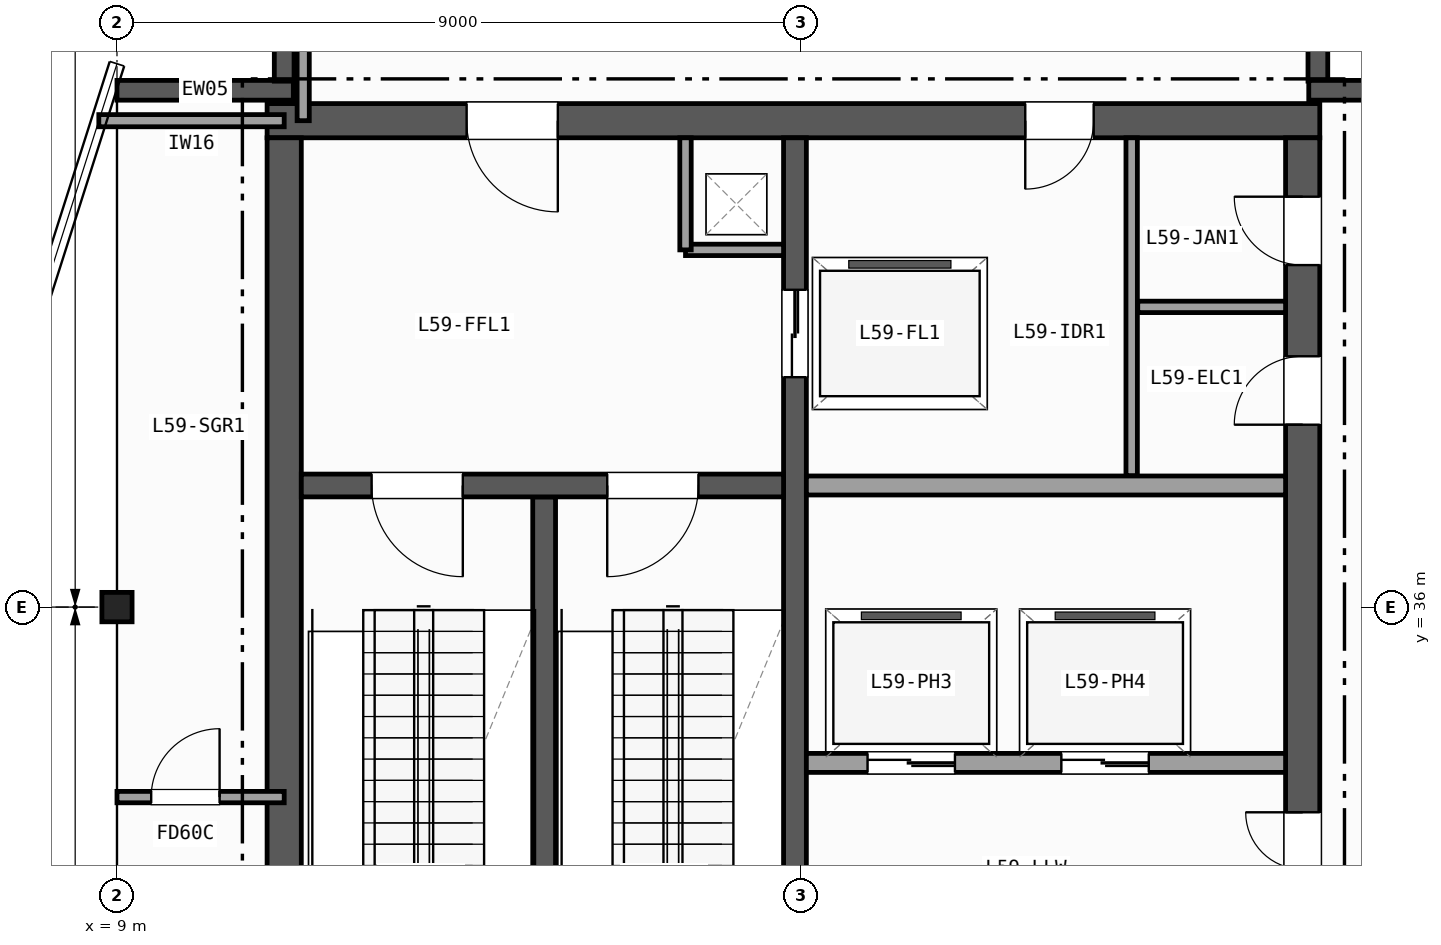
"""IFC4 building model, lengths in metres.
Left out: names, types, materials, properties, quantities, classifications, styles, units other than length and angle.
Written with IfcOpenShell. Run it as: python <this file> out.ifc"""

import sys

from ifc_helpers import new_model, si_unit, direction, frame, frame_2d, origin, origin_2d, place, context, subcontext, project, spatial, rectangle, i_section, extrude, element, fill, save


model = new_model("IFC4")
c1 = context("Model", 3, precision=1e-05, world=origin(), true_north=direction((0.0, 1.0)))
c2 = subcontext(c1, "Body", "Model", "MODEL_VIEW")
j1 = project(units=[si_unit("LENGTHUNIT", "METRE"), si_unit("PLANEANGLEUNIT", "RADIAN")], contexts=[c1])
p1 = place(None, origin())
s1 = spatial("IfcSite", under=j1, at=p1, CompositionType="ELEMENT")
p2 = place(p1, origin())
s2 = spatial("IfcBuilding", under=s1, at=p2, CompositionType="ELEMENT")
p3 = place(p2, frame((0.0, 0.0, 235.8)))
s3 = spatial("IfcBuildingStorey", under=s2, at=p3, CompositionType="ELEMENT", Elevation=235.8)
p4 = place(p3, frame((9.0, 36.0, 0.0), z_axis=(0.0, 0.0, 1.0), x_axis=(1.0, 0.0, 0.0)))
e1 = element("IfcColumn", 1, at=p4, inside=s3, PredefinedType="COLUMN", context=c2, shape_type="SweptSolid", body=[
    extrude(i_section(OverallWidth=0.397, OverallDepth=0.387, WebThickness=0.021, FlangeThickness=0.033, FilletRadius=0.015, at=origin_2d()), origin(), (0.0, 0.0, 1.0), 5.0),
])
p5 = place(p3, frame((9.0, 42.8, 0.0), z_axis=(0.0, 0.0, 1.0), x_axis=(1.0, 0.0, 0.0)))
e2 = element("IfcWall", 2, at=p5, inside=s3, PredefinedType="SOLIDWALL", context=c2, shape_type="SweptSolid", body=[
    extrude(rectangle(XDim=2.32, YDim=0.26, at=frame_2d((1.16, 0.0))), origin(), (0.0, 0.0, 1.0), 4.72),
])
for number, where, z_axis, x_axis in (
    (3, (11.2, 42.92, 0.0), (0.0, 0.0, 1.0), (0.0, 1.0, 0.0)),
    (4, (24.8, 45.0, 0.0), (0.0, 0.0, 1.0), (0.0, -1.0, 0.0)),
):
    element("IfcWall", number, at=place(p3, frame(where, z_axis=z_axis, x_axis=x_axis)), inside=s3, PredefinedType="SOLIDWALL", context=c2, shape_type="SweptSolid", body=[
        extrude(rectangle(XDim=2.08, YDim=0.26, at=frame_2d((1.04, 0.0))), origin(), (0.0, 0.0, 1.0), 4.72),
    ])
p6 = place(p3, frame((24.68, 42.8, 0.0), z_axis=(0.0, 0.0, 1.0), x_axis=(1.0, 0.0, 0.0)))
e5 = element("IfcWall", 5, at=p6, inside=s3, PredefinedType="SOLIDWALL", context=c2, shape_type="SweptSolid", body=[
    extrude(rectangle(XDim=2.32, YDim=0.26, at=frame_2d((1.16, 0.0))), origin(), (0.0, 0.0, 1.0), 4.72),
])
p7 = place(p3, frame((24.825, 42.4, 0.0), z_axis=(0.0, 0.0, 1.0), x_axis=(-1.0, 0.0, 0.0)))
e6 = element("IfcWall", 6, at=p7, inside=s3, PredefinedType="SHEAR", context=c2, shape_type="SweptSolid", body=[
    extrude(rectangle(XDim=13.85, YDim=0.45, at=frame_2d((6.925, 0.0))), origin(), (0.0, 0.0, 1.0), 4.72),
])
p8 = place(p7, frame((10.025, 0.0, 0.0)))
e7 = element("IfcOpeningElement", 7, at=p8, cuts=e6, PredefinedType="OPENING", context=c2, shape_type="SweptSolid", body=[
    extrude(rectangle(XDim=1.2, YDim=2.15, at=frame_2d((0.6, 1.075))), frame((0.0, 0.235, 0.0), z_axis=(0.0, -1.0, 0.0), x_axis=(1.0, 0.0, 0.0)), (0.0, 0.0, 1.0), 0.47),
])
p9 = place(p7, frame((2.975, 0.0, 0.0)))
e8 = element("IfcOpeningElement", 8, at=p9, cuts=e6, PredefinedType="OPENING", context=c2, shape_type="SweptSolid", body=[
    extrude(rectangle(XDim=0.9, YDim=2.1, at=frame_2d((0.45, 1.05))), frame((0.0, 0.235, 0.0), z_axis=(0.0, -1.0, 0.0), x_axis=(1.0, 0.0, 0.0)), (0.0, 0.0, 1.0), 0.47),
])
p10 = place(p3, frame((11.2, 42.175, 0.0), z_axis=(0.0, 0.0, 1.0), x_axis=(0.0, -1.0, 0.0)))
e9 = element("IfcWall", 9, at=p10, inside=s3, PredefinedType="SHEAR", context=c2, shape_type="SweptSolid", body=[
    extrude(rectangle(XDim=13.75, YDim=0.45, at=frame_2d((6.875, 0.0))), origin(), (0.0, 0.0, 1.0), 4.72),
])
p11 = place(p3, frame((24.6, 28.425, 0.0), z_axis=(0.0, 0.0, 1.0), x_axis=(0.0, 1.0, 0.0)))
e10 = element("IfcWall", 10, at=p11, inside=s3, PredefinedType="SHEAR", context=c2, shape_type="SweptSolid", body=[
    extrude(rectangle(XDim=13.75, YDim=0.45, at=frame_2d((6.875, 0.0))), origin(), (0.0, 0.0, 1.0), 4.72),
])
p12 = place(p11, frame((3.375, 0.0, 0.0)))
e11 = element("IfcOpeningElement", 11, at=p12, cuts=e10, PredefinedType="OPENING", context=c2, shape_type="SweptSolid", body=[
    extrude(rectangle(XDim=1.5, YDim=2.2, at=frame_2d((0.75, 1.1))), frame((0.0, 0.235, 0.0), z_axis=(0.0, -1.0, 0.0), x_axis=(1.0, 0.0, 0.0)), (0.0, 0.0, 1.0), 0.47),
])
p13 = place(p11, frame((9.975, 0.0, 0.0)))
e12 = element("IfcOpeningElement", 12, at=p13, cuts=e10, PredefinedType="OPENING", context=c2, shape_type="SweptSolid", body=[
    extrude(rectangle(XDim=0.9, YDim=2.1, at=frame_2d((0.45, 1.05))), frame((0.0, 0.235, 0.0), z_axis=(0.0, -1.0, 0.0), x_axis=(1.0, 0.0, 0.0)), (0.0, 0.0, 1.0), 0.47),
])
p14 = place(p11, frame((12.075, 0.0, 0.0)))
e13 = element("IfcOpeningElement", 13, at=p14, cuts=e10, PredefinedType="OPENING", context=c2, shape_type="SweptSolid", body=[
    extrude(rectangle(XDim=0.9, YDim=2.1, at=frame_2d((0.45, 1.05))), frame((0.0, 0.235, 0.0), z_axis=(0.0, -1.0, 0.0), x_axis=(1.0, 0.0, 0.0)), (0.0, 0.0, 1.0), 0.47),
])
p15 = place(p3, frame((14.62, 28.425, 0.0), z_axis=(0.0, 0.0, 1.0), x_axis=(0.0, 1.0, 0.0)))
e14 = element("IfcWall", 14, at=p15, inside=s3, PredefinedType="SHEAR", context=c2, shape_type="SweptSolid", body=[
    extrude(rectangle(XDim=9.025, YDim=0.3, at=frame_2d((4.512, 0.0))), origin(), (0.0, 0.0, 1.0), 4.72),
])
p16 = place(p3, frame((17.92, 42.175, 0.0), z_axis=(0.0, 0.0, 1.0), x_axis=(0.0, -1.0, 0.0)))
e15 = element("IfcWall", 15, at=p16, inside=s3, PredefinedType="SHEAR", context=c2, shape_type="SweptSolid", body=[
    extrude(rectangle(XDim=13.75, YDim=0.3, at=frame_2d((6.875, 0.0))), origin(), (0.0, 0.0, 1.0), 4.72),
])
p17 = place(p16, frame((2.0, 0.0, 0.0)))
e16 = element("IfcOpeningElement", 16, at=p17, cuts=e15, PredefinedType="OPENING", context=c2, shape_type="SweptSolid", body=[
    extrude(rectangle(XDim=1.15, YDim=2.15, at=frame_2d((0.575, 1.075))), frame((0.0, 0.16, 0.0), z_axis=(0.0, -1.0, 0.0), x_axis=(1.0, 0.0, 0.0)), (0.0, 0.0, 1.0), 0.32),
])
p18 = place(p3, frame((17.77, 37.6, 0.0), z_axis=(0.0, 0.0, 1.0), x_axis=(-1.0, 0.0, 0.0)))
e17 = element("IfcWall", 17, at=p18, inside=s3, PredefinedType="SHEAR", context=c2, shape_type="SweptSolid", body=[
    extrude(rectangle(XDim=6.345, YDim=0.3, at=frame_2d((3.172, 0.0))), origin(), (0.0, 0.0, 1.0), 4.72),
])
p19 = place(p18, frame((4.22, 0.0, 0.0)))
e18 = element("IfcOpeningElement", 18, at=p19, cuts=e17, PredefinedType="OPENING", context=c2, shape_type="SweptSolid", body=[
    extrude(rectangle(XDim=1.2, YDim=2.15, at=frame_2d((0.6, 1.075))), frame((0.0, 0.16, 0.0), z_axis=(0.0, -1.0, 0.0), x_axis=(1.0, 0.0, 0.0)), (0.0, 0.0, 1.0), 0.32),
])
p20 = place(p18, frame((1.12, 0.0, 0.0)))
e19 = element("IfcOpeningElement", 19, at=p20, cuts=e17, PredefinedType="OPENING", context=c2, shape_type="SweptSolid", body=[
    extrude(rectangle(XDim=1.2, YDim=2.15, at=frame_2d((0.6, 1.075))), frame((0.0, 0.16, 0.0), z_axis=(0.0, -1.0, 0.0), x_axis=(1.0, 0.0, 0.0)), (0.0, 0.0, 1.0), 0.32),
])
p21 = place(p3, frame((16.48, 40.7, 0.0), z_axis=(0.0, 0.0, 1.0), x_axis=(1.0, 0.0, 0.0)))
e20 = element("IfcWall", 20, at=p21, inside=s3, PredefinedType="PARTITIONING", context=c2, shape_type="SweptSolid", body=[
    extrude(rectangle(XDim=1.29, YDim=0.15, at=frame_2d((0.645, 0.0))), origin(), (0.0, 0.0, 1.0), 4.72),
])
p22 = place(p3, frame((16.48, 40.7, 0.0), z_axis=(0.0, 0.0, 1.0), x_axis=(0.0, 1.0, 0.0)))
e21 = element("IfcWall", 21, at=p22, inside=s3, PredefinedType="PARTITIONING", context=c2, shape_type="SweptSolid", body=[
    extrude(rectangle(XDim=1.475, YDim=0.15, at=frame_2d((0.738, 0.0))), origin(), (0.0, 0.0, 1.0), 4.72),
])
p23 = place(p3, frame((18.07, 37.6, 0.0), z_axis=(0.0, 0.0, 1.0), x_axis=(1.0, 0.0, 0.0)))
e22 = element("IfcWall", 22, at=p23, inside=s3, PredefinedType="PARTITIONING", context=c2, shape_type="SweptSolid", body=[
    extrude(rectangle(XDim=6.305, YDim=0.25, at=frame_2d((3.152, 0.0))), origin(), (0.0, 0.0, 1.0), 4.72),
])
p24 = place(p3, frame((24.375, 33.95, 0.0), z_axis=(0.0, 0.0, 1.0), x_axis=(-1.0, 0.0, 0.0)))
e23 = element("IfcWall", 23, at=p24, inside=s3, PredefinedType="PARTITIONING", context=c2, shape_type="SweptSolid", body=[
    extrude(rectangle(XDim=6.305, YDim=0.25, at=frame_2d((3.152, 0.0))), origin(), (0.0, 0.0, 1.0), 4.72),
])
p25 = place(p24, frame((4.35, 0.0, 0.0)))
e24 = element("IfcOpeningElement", 24, at=p25, cuts=e23, PredefinedType="OPENING", context=c2, shape_type="SweptSolid", body=[
    extrude(rectangle(XDim=1.15, YDim=2.15, at=frame_2d((0.575, 1.075))), frame((0.0, 0.135, 0.0), z_axis=(0.0, -1.0, 0.0), x_axis=(1.0, 0.0, 0.0)), (0.0, 0.0, 1.0), 0.27),
])
p26 = place(p24, frame((1.8, 0.0, 0.0)))
e25 = element("IfcOpeningElement", 25, at=p26, cuts=e23, PredefinedType="OPENING", context=c2, shape_type="SweptSolid", body=[
    extrude(rectangle(XDim=1.15, YDim=2.15, at=frame_2d((0.575, 1.075))), frame((0.0, 0.135, 0.0), z_axis=(0.0, -1.0, 0.0), x_axis=(1.0, 0.0, 0.0)), (0.0, 0.0, 1.0), 0.27),
])
p27 = place(p3, frame((22.35, 37.73, 0.0), z_axis=(0.0, 0.0, 1.0), x_axis=(0.0, 1.0, 0.0)))
e26 = element("IfcWall", 26, at=p27, inside=s3, PredefinedType="PARTITIONING", context=c2, shape_type="SweptSolid", body=[
    extrude(rectangle(XDim=4.445, YDim=0.15, at=frame_2d((2.223, 0.0))), origin(), (0.0, 0.0, 1.0), 4.72),
])
p28 = place(p3, frame((22.43, 39.95, 0.0), z_axis=(0.0, 0.0, 1.0), x_axis=(1.0, 0.0, 0.0)))
e27 = element("IfcWall", 27, at=p28, inside=s3, PredefinedType="PARTITIONING", context=c2, shape_type="SweptSolid", body=[
    extrude(rectangle(XDim=1.945, YDim=0.15, at=frame_2d((0.973, 0.0))), origin(), (0.0, 0.0, 1.0), 4.72),
])
p29 = place(p3, frame((8.761, 42.4, 0.0), z_axis=(0.0, 0.0, 1.0), x_axis=(1.0, 0.0, 0.0)))
e28 = element("IfcWall", 28, at=p29, inside=s3, PredefinedType="PARTITIONING", context=c2, shape_type="SweptSolid", body=[
    extrude(rectangle(XDim=2.439, YDim=0.16, at=frame_2d((1.219, 0.0))), origin(), (0.0, 0.0, 1.0), 4.72),
])
p30 = place(p3, frame((11.45, 42.4, 0.0), z_axis=(0.0, 0.0, 1.0), x_axis=(0.0, 1.0, 0.0)))
e29 = element("IfcWall", 29, at=p30, inside=s3, PredefinedType="PARTITIONING", context=c2, shape_type="SweptSolid", body=[
    extrude(rectangle(XDim=2.666, YDim=0.16, at=frame_2d((1.333, 0.0))), origin(), (0.0, 0.0, 1.0), 4.72),
])
p31 = place(p3, frame((9.0, 33.5, 0.0), z_axis=(0.0, 0.0, 1.0), x_axis=(1.0, 0.0, 0.0)))
e30 = element("IfcWall", 30, at=p31, inside=s3, PredefinedType="PARTITIONING", context=c2, shape_type="SweptSolid", body=[
    extrude(rectangle(XDim=2.2, YDim=0.15, at=frame_2d((1.1, 0.0))), origin(), (0.0, 0.0, 1.0), 4.007),
])
p32 = place(p31, frame((0.45, 0.0, 0.0)))
e31 = element("IfcOpeningElement", 31, at=p32, cuts=e30, PredefinedType="OPENING", context=c2, shape_type="SweptSolid", body=[
    extrude(rectangle(XDim=0.9, YDim=2.1, at=frame_2d((0.45, 1.05))), frame((0.0, 0.085, 0.0), z_axis=(0.0, -1.0, 0.0), x_axis=(1.0, 0.0, 0.0)), (0.0, 0.0, 1.0), 0.17),
])
p33 = place(p19, origin())
e32 = element("IfcDoor", 32, at=p33, inside=s3, OperationType="SINGLE_SWING_LEFT", PredefinedType="DOOR", context=c2, shape_type="SweptSolid", body=[
    extrude(rectangle(XDim=1.2, YDim=2.15, at=frame_2d((0.6, 1.075))), frame((0.0, 0.025, 0.0), z_axis=(0.0, -1.0, 0.0), x_axis=(1.0, 0.0, 0.0)), (0.0, 0.0, 1.0), 0.05),
])
fill(e18, e32)
p34 = place(p20, origin())
e33 = element("IfcDoor", 33, at=p34, inside=s3, OperationType="SINGLE_SWING_RIGHT", PredefinedType="DOOR", context=c2, shape_type="SweptSolid", body=[
    extrude(rectangle(XDim=1.2, YDim=2.15, at=frame_2d((0.6, 1.075))), frame((0.0, 0.025, 0.0), z_axis=(0.0, -1.0, 0.0), x_axis=(1.0, 0.0, 0.0)), (0.0, 0.0, 1.0), 0.05),
])
fill(e19, e33)
p35 = place(p12, origin())
e34 = element("IfcDoor", 34, at=p35, inside=s3, OperationType="DOUBLE_DOOR_SINGLE_SWING", PredefinedType="DOOR", context=c2, shape_type="SweptSolid", body=[
    extrude(rectangle(XDim=1.5, YDim=2.2, at=frame_2d((0.75, 1.1))), frame((0.0, 0.025, 0.0), z_axis=(0.0, -1.0, 0.0), x_axis=(1.0, 0.0, 0.0)), (0.0, 0.0, 1.0), 0.05),
])
fill(e11, e34)
p36 = place(p8, origin())
e35 = element("IfcDoor", 35, at=p36, inside=s3, OperationType="SINGLE_SWING_LEFT", PredefinedType="DOOR", context=c2, shape_type="SweptSolid", body=[
    extrude(rectangle(XDim=1.2, YDim=2.15, at=frame_2d((0.6, 1.075))), frame((0.0, 0.025, 0.0), z_axis=(0.0, -1.0, 0.0), x_axis=(1.0, 0.0, 0.0)), (0.0, 0.0, 1.0), 0.05),
])
fill(e7, e35)
p37 = place(p13, origin())
e36 = element("IfcDoor", 36, at=p37, inside=s3, OperationType="SINGLE_SWING_LEFT", PredefinedType="DOOR", context=c2, shape_type="SweptSolid", body=[
    extrude(rectangle(XDim=0.9, YDim=2.1, at=frame_2d((0.45, 1.05))), frame((0.0, 0.025, 0.0), z_axis=(0.0, -1.0, 0.0), x_axis=(1.0, 0.0, 0.0)), (0.0, 0.0, 1.0), 0.05),
])
fill(e12, e36)
p38 = place(p9, origin())
e37 = element("IfcDoor", 37, at=p38, inside=s3, OperationType="SINGLE_SWING_RIGHT", PredefinedType="DOOR", context=c2, shape_type="SweptSolid", body=[
    extrude(rectangle(XDim=0.9, YDim=2.1, at=frame_2d((0.45, 1.05))), frame((0.0, 0.025, 0.0), z_axis=(0.0, -1.0, 0.0), x_axis=(1.0, 0.0, 0.0)), (0.0, 0.0, 1.0), 0.05),
])
fill(e8, e37)
p39 = place(p14, origin())
e38 = element("IfcDoor", 38, at=p39, inside=s3, OperationType="SINGLE_SWING_RIGHT", PredefinedType="DOOR", context=c2, shape_type="SweptSolid", body=[
    extrude(rectangle(XDim=0.9, YDim=2.1, at=frame_2d((0.45, 1.05))), frame((0.0, 0.025, 0.0), z_axis=(0.0, -1.0, 0.0), x_axis=(1.0, 0.0, 0.0)), (0.0, 0.0, 1.0), 0.05),
])
fill(e13, e38)
p40 = place(p17, origin())
e39 = element("IfcDoor", 39, at=p40, inside=s3, OperationType="DOUBLE_DOOR_SLIDING", PredefinedType="DOOR", context=c2, shape_type="SweptSolid", body=[
    extrude(rectangle(XDim=1.15, YDim=2.15, at=frame_2d((0.575, 1.075))), frame((0.0, 0.025, 0.0), z_axis=(0.0, -1.0, 0.0), x_axis=(1.0, 0.0, 0.0)), (0.0, 0.0, 1.0), 0.05),
])
fill(e16, e39)
p41 = place(p25, origin())
e40 = element("IfcDoor", 40, at=p41, inside=s3, OperationType="DOUBLE_DOOR_SLIDING", PredefinedType="DOOR", context=c2, shape_type="SweptSolid", body=[
    extrude(rectangle(XDim=1.15, YDim=2.15, at=frame_2d((0.575, 1.075))), frame((0.0, 0.025, 0.0), z_axis=(0.0, -1.0, 0.0), x_axis=(1.0, 0.0, 0.0)), (0.0, 0.0, 1.0), 0.05),
])
fill(e24, e40)
p42 = place(p26, origin())
e41 = element("IfcDoor", 41, at=p42, inside=s3, OperationType="DOUBLE_DOOR_SLIDING", PredefinedType="DOOR", context=c2, shape_type="SweptSolid", body=[
    extrude(rectangle(XDim=1.15, YDim=2.15, at=frame_2d((0.575, 1.075))), frame((0.0, 0.025, 0.0), z_axis=(0.0, -1.0, 0.0), x_axis=(1.0, 0.0, 0.0)), (0.0, 0.0, 1.0), 0.05),
])
fill(e25, e41)
p43 = place(p32, origin())
e42 = element("IfcDoor", 42, at=p43, inside=s3, OperationType="SINGLE_SWING_RIGHT", PredefinedType="DOOR", context=c2, shape_type="SweptSolid", body=[
    extrude(rectangle(XDim=0.9, YDim=2.1, at=frame_2d((0.45, 1.05))), frame((0.0, 0.025, 0.0), z_axis=(0.0, -1.0, 0.0), x_axis=(1.0, 0.0, 0.0)), (0.0, 0.0, 1.0), 0.05),
])
fill(e31, e42)
save(model, sys.argv[1])
